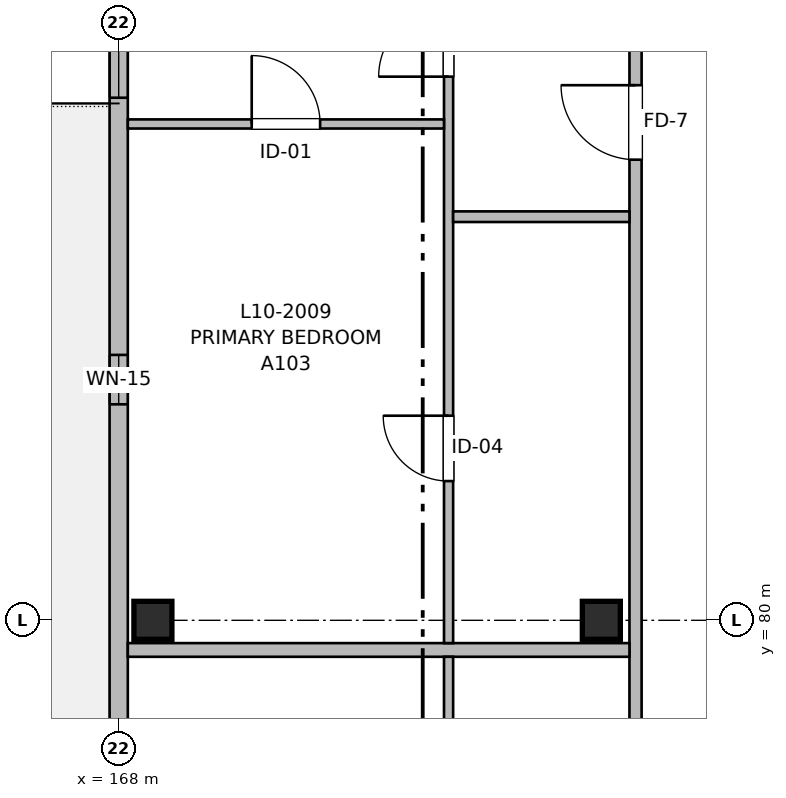
"""IFC4 building model, lengths in metres.
Left out: names, types, materials, properties, quantities, classifications, styles, units other than length and angle.
Written with IfcOpenShell. Run it as: python <this file> out.ifc"""

import sys

from ifc_helpers import new_model, si_unit, direction, frame, frame_2d, origin, origin_2d, place, context, subcontext, project, spatial, rectangle, extrude, element, fill, save


model = new_model("IFC4")
c1 = context("Model", 3, precision=1e-05, world=origin(), true_north=direction((0.0, 1.0)))
c2 = subcontext(c1, "Body", "Model", "MODEL_VIEW")
j1 = project(units=[si_unit("LENGTHUNIT", "METRE"), si_unit("PLANEANGLEUNIT", "RADIAN")], contexts=[c1])
p1 = place(None, origin())
s1 = spatial("IfcSite", under=j1, at=p1, CompositionType="ELEMENT")
p2 = place(p1, origin())
s2 = spatial("IfcBuilding", under=s1, at=p2, CompositionType="ELEMENT")
p3 = place(p2, frame((0.0, 0.0, 32.96)))
s3 = spatial("IfcBuildingStorey", under=s2, at=p3, CompositionType="ELEMENT", Elevation=32.96)
for number, where, z_axis, x_axis in (
    (1, (168.45, 80.0, 0.0), (0.0, 0.0, 1.0), (1.0, 0.0, 0.0)),
    (2, (174.35, 80.0, 0.0), (0.0, 0.0, 1.0), (1.0, 0.0, 0.0)),
):
    element("IfcColumn", number, at=place(p3, frame(where, z_axis=z_axis, x_axis=x_axis)), inside=s3, PredefinedType="COLUMN", context=c2, shape_type="SweptSolid", body=[
        extrude(rectangle(XDim=0.5, YDim=0.5, at=origin_2d()), origin(), (0.0, 0.0, 1.0), 3.2),
    ])
p4 = place(p3, frame((168.0, 59.0, 0.0), z_axis=(0.0, 0.0, 1.0), x_axis=(0.0, 1.0, 0.0)))
e3 = element("IfcWall", 3, at=p4, inside=s3, PredefinedType="SOLIDWALL", context=c2, shape_type="SweptSolid", body=[
    extrude(rectangle(XDim=29.0, YDim=0.24, at=frame_2d((14.5, 0.0))), origin(), (0.0, 0.0, 1.0), 2.98),
])
p5 = place(p4, frame((3.033, 0.0, 0.0)))
e4 = element("IfcOpeningElement", 4, at=p5, cuts=e3, PredefinedType="OPENING", context=c2, shape_type="SweptSolid", body=[
    extrude(rectangle(XDim=1.2, YDim=2.2, at=frame_2d((0.6, 1.1))), frame((0.0, 0.13, 0.0), z_axis=(0.0, -1.0, 0.0), x_axis=(1.0, 0.0, 0.0)), (0.0, 0.0, 1.0), 0.26),
])
p6 = place(p4, frame((6.133, 0.0, 0.82)))
e5 = element("IfcOpeningElement", 5, at=p6, cuts=e3, PredefinedType="OPENING", context=c2, shape_type="SweptSolid", body=[
    extrude(rectangle(XDim=1.5, YDim=1.4, at=frame_2d((0.75, 0.7))), frame((0.0, 0.13, 0.0), z_axis=(0.0, -1.0, 0.0), x_axis=(1.0, 0.0, 0.0)), (0.0, 0.0, 1.0), 0.26),
])
p7 = place(p4, frame((13.9, 0.0, 0.9)))
e6 = element("IfcOpeningElement", 6, at=p7, cuts=e3, PredefinedType="OPENING", context=c2, shape_type="SweptSolid", body=[
    extrude(rectangle(XDim=1.2, YDim=1.05, at=frame_2d((0.6, 0.525))), frame((0.0, 0.13, 0.0), z_axis=(0.0, -1.0, 0.0), x_axis=(1.0, 0.0, 0.0)), (0.0, 0.0, 1.0), 0.26),
])
p8 = place(p4, frame((23.842, 0.0, 0.9)))
e7 = element("IfcOpeningElement", 7, at=p8, cuts=e3, PredefinedType="OPENING", context=c2, shape_type="SweptSolid", body=[
    extrude(rectangle(XDim=0.65, YDim=0.95, at=frame_2d((0.325, 0.475))), frame((0.0, 0.13, 0.0), z_axis=(0.0, -1.0, 0.0), x_axis=(1.0, 0.0, 0.0)), (0.0, 0.0, 1.0), 0.26),
])
p9 = place(p4, frame((17.535, 0.0, 0.82)))
e8 = element("IfcOpeningElement", 8, at=p9, cuts=e3, PredefinedType="OPENING", context=c2, shape_type="SweptSolid", body=[
    extrude(rectangle(XDim=1.5, YDim=1.4, at=frame_2d((0.75, 0.7))), frame((0.0, 0.13, 0.0), z_axis=(0.0, -1.0, 0.0), x_axis=(1.0, 0.0, 0.0)), (0.0, 0.0, 1.0), 0.26),
])
p10 = place(p4, frame((27.875, 0.0, 0.9)))
e9 = element("IfcOpeningElement", 9, at=p10, cuts=e3, PredefinedType="OPENING", context=c2, shape_type="SweptSolid", body=[
    extrude(rectangle(XDim=0.65, YDim=0.95, at=frame_2d((0.325, 0.475))), frame((0.0, 0.13, 0.0), z_axis=(0.0, -1.0, 0.0), x_axis=(1.0, 0.0, 0.0)), (0.0, 0.0, 1.0), 0.26),
])
p11 = place(p3, frame((174.8, 59.16, 0.0), z_axis=(0.0, 0.0, 1.0), x_axis=(0.0, 1.0, 0.0)))
e10 = element("IfcWall", 10, at=p11, inside=s3, PredefinedType="PARTITIONING", context=c2, shape_type="SweptSolid", body=[
    extrude(rectangle(XDim=47.64, YDim=0.16, at=frame_2d((23.82, 0.0))), origin(), (0.0, 0.0, 1.0), 2.935),
])
p12 = place(p11, frame((5.7, 0.0, 0.0)))
e11 = element("IfcOpeningElement", 11, at=p12, cuts=e10, PredefinedType="OPENING", context=c2, shape_type="SweptSolid", body=[
    extrude(rectangle(XDim=0.98, YDim=2.15, at=frame_2d((0.49, 1.075))), frame((0.0, 0.09, 0.0), z_axis=(0.0, -1.0, 0.0), x_axis=(1.0, 0.0, 0.0)), (0.0, 0.0, 1.0), 0.18),
])
p13 = place(p11, frame((15.56, 0.0, 0.0)))
e12 = element("IfcOpeningElement", 12, at=p13, cuts=e10, PredefinedType="OPENING", context=c2, shape_type="SweptSolid", body=[
    extrude(rectangle(XDim=0.98, YDim=2.15, at=frame_2d((0.49, 1.075))), frame((0.0, 0.09, 0.0), z_axis=(0.0, -1.0, 0.0), x_axis=(1.0, 0.0, 0.0)), (0.0, 0.0, 1.0), 0.18),
])
p14 = place(p11, frame((26.9, 0.0, 0.0)))
e13 = element("IfcOpeningElement", 13, at=p14, cuts=e10, PredefinedType="OPENING", context=c2, shape_type="SweptSolid", body=[
    extrude(rectangle(XDim=0.98, YDim=2.15, at=frame_2d((0.49, 1.075))), frame((0.0, 0.09, 0.0), z_axis=(0.0, -1.0, 0.0), x_axis=(1.0, 0.0, 0.0)), (0.0, 0.0, 1.0), 0.18),
])
p15 = place(p11, frame((40.4, 0.0, 0.0)))
e14 = element("IfcOpeningElement", 14, at=p15, cuts=e10, PredefinedType="OPENING", context=c2, shape_type="SweptSolid", body=[
    extrude(rectangle(XDim=0.98, YDim=2.15, at=frame_2d((0.49, 1.075))), frame((0.0, 0.09, 0.0), z_axis=(0.0, -1.0, 0.0), x_axis=(1.0, 0.0, 0.0)), (0.0, 0.0, 1.0), 0.18),
])
p16 = place(p3, frame((168.12, 79.61, 0.0), z_axis=(0.0, 0.0, 1.0), x_axis=(1.0, 0.0, 0.0)))
e15 = element("IfcWall", 15, at=p16, inside=s3, PredefinedType="PARTITIONING", context=c2, shape_type="SweptSolid", body=[
    extrude(rectangle(XDim=6.6, YDim=0.18, at=frame_2d((3.3, 0.0))), origin(), (0.0, 0.0, 1.0), 2.935),
])
p17 = place(p3, frame((172.34, 69.24, 0.0), z_axis=(0.0, 0.0, 1.0), x_axis=(0.0, 1.0, 0.0)))
e16 = element("IfcWall", 16, at=p17, inside=s3, PredefinedType="PARTITIONING", context=c2, shape_type="SweptSolid", body=[
    extrude(rectangle(XDim=10.28, YDim=0.12, at=frame_2d((5.14, 0.0))), origin(), (0.0, 0.0, 1.0), 2.935),
])
p18 = place(p17, frame((1.797, 0.0, 0.0)))
e17 = element("IfcOpeningElement", 17, at=p18, cuts=e16, PredefinedType="OPENING", context=c2, shape_type="SweptSolid", body=[
    extrude(rectangle(XDim=0.86, YDim=2.1, at=frame_2d((0.43, 1.05))), frame((0.0, 0.07, 0.0), z_axis=(0.0, -1.0, 0.0), x_axis=(1.0, 0.0, 0.0)), (0.0, 0.0, 1.0), 0.14),
])
p19 = place(p17, frame((6.284, 0.0, 0.0)))
e18 = element("IfcOpeningElement", 18, at=p19, cuts=e16, PredefinedType="OPENING", context=c2, shape_type="SweptSolid", body=[
    extrude(rectangle(XDim=0.92, YDim=2.1, at=frame_2d((0.46, 1.05))), frame((0.0, 0.07, 0.0), z_axis=(0.0, -1.0, 0.0), x_axis=(1.0, 0.0, 0.0)), (0.0, 0.0, 1.0), 0.14),
])
p20 = place(p3, frame((172.34, 79.7, 0.0), z_axis=(0.0, 0.0, 1.0), x_axis=(0.0, 1.0, 0.0)))
e19 = element("IfcWall", 19, at=p20, inside=s3, PredefinedType="PARTITIONING", context=c2, shape_type="SweptSolid", body=[
    extrude(rectangle(XDim=12.19, YDim=0.12, at=frame_2d((6.095, 0.0))), origin(), (0.0, 0.0, 1.0), 2.935),
])
p21 = place(p20, frame((2.132, 0.0, 0.0)))
e20 = element("IfcOpeningElement", 20, at=p21, cuts=e19, PredefinedType="OPENING", context=c2, shape_type="SweptSolid", body=[
    extrude(rectangle(XDim=0.86, YDim=2.1, at=frame_2d((0.43, 1.05))), frame((0.0, 0.07, 0.0), z_axis=(0.0, -1.0, 0.0), x_axis=(1.0, 0.0, 0.0)), (0.0, 0.0, 1.0), 0.14),
])
p22 = place(p20, frame((7.452, 0.0, 0.0)))
e21 = element("IfcOpeningElement", 21, at=p22, cuts=e19, PredefinedType="OPENING", context=c2, shape_type="SweptSolid", body=[
    extrude(rectangle(XDim=0.92, YDim=2.1, at=frame_2d((0.46, 1.05))), frame((0.0, 0.07, 0.0), z_axis=(0.0, -1.0, 0.0), x_axis=(1.0, 0.0, 0.0)), (0.0, 0.0, 1.0), 0.14),
])
p23 = place(p3, frame((172.4, 85.31, 0.0), z_axis=(0.0, 0.0, 1.0), x_axis=(1.0, 0.0, 0.0)))
e22 = element("IfcWall", 22, at=p23, inside=s3, PredefinedType="PARTITIONING", context=c2, shape_type="SweptSolid", body=[
    extrude(rectangle(XDim=2.32, YDim=0.14, at=frame_2d((1.16, 0.0))), origin(), (0.0, 0.0, 1.0), 2.935),
])
p24 = place(p3, frame((168.12, 86.53, 0.0), z_axis=(0.0, 0.0, 1.0), x_axis=(1.0, 0.0, 0.0)))
e23 = element("IfcWall", 23, at=p24, inside=s3, PredefinedType="PARTITIONING", context=c2, shape_type="SweptSolid", body=[
    extrude(rectangle(XDim=4.16, YDim=0.12, at=frame_2d((2.08, 0.0))), origin(), (0.0, 0.0, 1.0), 2.935),
])
p25 = place(p24, frame((1.63, 0.0, 0.0)))
e24 = element("IfcOpeningElement", 24, at=p25, cuts=e23, PredefinedType="OPENING", context=c2, shape_type="SweptSolid", body=[
    extrude(rectangle(XDim=0.9, YDim=2.1, at=frame_2d((0.45, 1.05))), frame((0.0, 0.07, 0.0), z_axis=(0.0, -1.0, 0.0), x_axis=(1.0, 0.0, 0.0)), (0.0, 0.0, 1.0), 0.14),
])
p26 = place(p8, origin())
e25 = element("IfcWindow", 25, at=p26, inside=s3, PartitioningType="SINGLE_PANEL", PredefinedType="WINDOW", context=c2, shape_type="SweptSolid", body=[
    extrude(rectangle(XDim=0.65, YDim=0.95, at=frame_2d((0.325, 0.475))), frame((0.0, 0.03, 0.0), z_axis=(0.0, -1.0, 0.0), x_axis=(1.0, 0.0, 0.0)), (0.0, 0.0, 1.0), 0.06),
])
fill(e7, e25)
p27 = place(p21, origin())
e26 = element("IfcDoor", 26, at=p27, inside=s3, OperationType="SINGLE_SWING_RIGHT", PredefinedType="DOOR", context=c2, shape_type="SweptSolid", body=[
    extrude(rectangle(XDim=0.86, YDim=2.1, at=frame_2d((0.43, 1.05))), frame((0.0, 0.025, 0.0), z_axis=(0.0, -1.0, 0.0), x_axis=(1.0, 0.0, 0.0)), (0.0, 0.0, 1.0), 0.05),
])
fill(e20, e26)
p28 = place(p22, origin())
e27 = element("IfcDoor", 27, at=p28, inside=s3, OperationType="SINGLE_SWING_LEFT", PredefinedType="DOOR", context=c2, shape_type="SweptSolid", body=[
    extrude(rectangle(XDim=0.92, YDim=2.1, at=frame_2d((0.46, 1.05))), frame((0.0, 0.025, 0.0), z_axis=(0.0, -1.0, 0.0), x_axis=(1.0, 0.0, 0.0)), (0.0, 0.0, 1.0), 0.05),
])
fill(e21, e27)
p29 = place(p14, origin())
e28 = element("IfcDoor", 28, at=p29, inside=s3, OperationType="SINGLE_SWING_RIGHT", PredefinedType="DOOR", context=c2, shape_type="SweptSolid", body=[
    extrude(rectangle(XDim=0.98, YDim=2.15, at=frame_2d((0.49, 1.075))), frame((0.0, 0.025, 0.0), z_axis=(0.0, -1.0, 0.0), x_axis=(1.0, 0.0, 0.0)), (0.0, 0.0, 1.0), 0.05),
])
fill(e13, e28)
p30 = place(p25, origin())
e29 = element("IfcDoor", 29, at=p30, inside=s3, OperationType="SINGLE_SWING_LEFT", PredefinedType="DOOR", context=c2, shape_type="SweptSolid", body=[
    extrude(rectangle(XDim=0.9, YDim=2.1, at=frame_2d((0.45, 1.05))), frame((0.0, 0.025, 0.0), z_axis=(0.0, -1.0, 0.0), x_axis=(1.0, 0.0, 0.0)), (0.0, 0.0, 1.0), 0.05),
])
fill(e24, e29)
p31 = place(p10, origin())
e30 = element("IfcWindow", 30, at=p31, inside=s3, PartitioningType="SINGLE_PANEL", PredefinedType="WINDOW", context=c2, shape_type="SweptSolid", body=[
    extrude(rectangle(XDim=0.65, YDim=0.95, at=frame_2d((0.325, 0.475))), frame((0.0, 0.03, 0.0), z_axis=(0.0, -1.0, 0.0), x_axis=(1.0, 0.0, 0.0)), (0.0, 0.0, 1.0), 0.06),
])
fill(e9, e30)
save(model, sys.argv[1])
